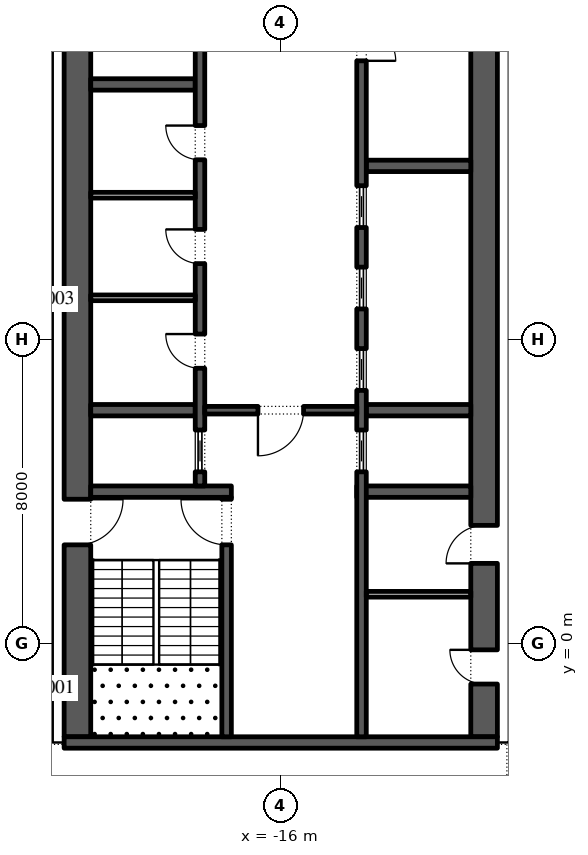
"""IFC4 building model, lengths in metres.
Left out: names, types, materials, properties, quantities, classifications, styles, units other than length and angle.
Written with IfcOpenShell. Run it as: python <this file> out.ifc"""

import sys

from ifc_helpers import new_model, si_unit, direction, frame, frame_2d, origin, place, context, subcontext, project, spatial, rectangle, extrude, element, fill, save


model = new_model("IFC4")
c1 = context("Model", 3, precision=1e-05, world=origin(), true_north=direction((0.0, 1.0)))
c2 = subcontext(c1, "Body", "Model", "MODEL_VIEW")
j1 = project(units=[si_unit("LENGTHUNIT", "METRE"), si_unit("PLANEANGLEUNIT", "RADIAN")], contexts=[c1])
p1 = place(None, origin())
s1 = spatial("IfcSite", under=j1, at=p1, CompositionType="ELEMENT")
p2 = place(p1, origin())
s2 = spatial("IfcBuilding", under=s1, at=p2, CompositionType="ELEMENT")
p3 = place(p2, frame((0.0, 0.0, 171.6)))
s3 = spatial("IfcBuildingStorey", under=s2, at=p3, CompositionType="ELEMENT", Elevation=171.6)
p4 = place(p3, frame((-33.157, 30.092, 0.0), z_axis=(0.0, 0.0, 1.0), x_axis=(0.224950279389, -0.974370243697, 0.0)))
e1 = element("IfcWall", 1, at=p4, inside=s3, PredefinedType="STANDARD", context=c2, shape_type="SweptSolid", body=[
    extrude(rectangle(XDim=49.5, YDim=0.3, at=frame_2d((24.75, 0.0))), origin(), (0.0, 0.0, 1.0), 4.0),
])
p5 = place(p4, frame((2.207, 0.0, 0.0)))
e2 = element("IfcOpeningElement", 2, at=p5, cuts=e1, PredefinedType="OPENING", context=c2, shape_type="SweptSolid", body=[
    extrude(rectangle(XDim=2.4, YDim=3.5, at=frame_2d((1.2, 1.75))), frame((0.0, 0.16, 0.0), z_axis=(0.0, -1.0, 0.0), x_axis=(1.0, 0.0, 0.0)), (0.0, 0.0, 1.0), 0.32),
])
p6 = place(p4, frame((8.121, 0.0, 0.45)))
e3 = element("IfcOpeningElement", 3, at=p6, cuts=e1, PredefinedType="OPENING", context=c2, shape_type="SweptSolid", body=[
    extrude(rectangle(XDim=4.5, YDim=2.825, at=frame_2d((2.25, 1.413))), frame((0.0, 0.16, 0.0), z_axis=(0.0, -1.0, 0.0), x_axis=(1.0, 0.0, 0.0)), (0.0, 0.0, 1.0), 0.32),
])
p7 = place(p4, frame((15.236, 0.0, 0.45)))
e4 = element("IfcOpeningElement", 4, at=p7, cuts=e1, PredefinedType="OPENING", context=c2, shape_type="SweptSolid", body=[
    extrude(rectangle(XDim=4.5, YDim=2.95, at=frame_2d((2.25, 1.475))), frame((0.0, 0.16, 0.0), z_axis=(0.0, -1.0, 0.0), x_axis=(1.0, 0.0, 0.0)), (0.0, 0.0, 1.0), 0.32),
])
p8 = place(p4, frame((22.35, 0.0, 0.45)))
e5 = element("IfcOpeningElement", 5, at=p8, cuts=e1, PredefinedType="OPENING", context=c2, shape_type="SweptSolid", body=[
    extrude(rectangle(XDim=4.5, YDim=3.0, at=frame_2d((2.25, 1.5))), frame((0.0, 0.16, 0.0), z_axis=(0.0, -1.0, 0.0), x_axis=(1.0, 0.0, 0.0)), (0.0, 0.0, 1.0), 0.32),
])
p9 = place(p4, frame((30.514, 0.0, 0.0)))
e6 = element("IfcOpeningElement", 6, at=p9, cuts=e1, PredefinedType="OPENING", context=c2, shape_type="SweptSolid", body=[
    extrude(rectangle(XDim=2.4, YDim=3.5, at=frame_2d((1.2, 1.75))), frame((0.0, 0.16, 0.0), z_axis=(0.0, -1.0, 0.0), x_axis=(1.0, 0.0, 0.0)), (0.0, 0.0, 1.0), 0.32),
])
p10 = place(p4, frame((36.579, 0.0, 0.45)))
e7 = element("IfcOpeningElement", 7, at=p10, cuts=e1, PredefinedType="OPENING", context=c2, shape_type="SweptSolid", body=[
    extrude(rectangle(XDim=4.5, YDim=3.05, at=frame_2d((2.25, 1.525))), frame((0.0, 0.16, 0.0), z_axis=(0.0, -1.0, 0.0), x_axis=(1.0, 0.0, 0.0)), (0.0, 0.0, 1.0), 0.32),
])
p11 = place(p4, frame((43.693, 0.0, 0.45)))
e8 = element("IfcOpeningElement", 8, at=p11, cuts=e1, PredefinedType="OPENING", context=c2, shape_type="SweptSolid", body=[
    extrude(rectangle(XDim=4.5, YDim=3.05, at=frame_2d((2.25, 1.525))), frame((0.0, 0.16, 0.0), z_axis=(0.0, -1.0, 0.0), x_axis=(1.0, 0.0, 0.0)), (0.0, 0.0, 1.0), 0.32),
])
p12 = place(p3, frame((-21.35, -2.45, 0.0), z_axis=(0.0, 0.0, 1.0), x_axis=(0.0, 1.0, 0.0)))
e9 = element("IfcWall", 9, at=p12, inside=s3, PredefinedType="SHEAR", context=c2, shape_type="SweptSolid", body=[
    extrude(rectangle(XDim=27.9, YDim=0.7, at=frame_2d((13.95, 0.0))), origin(), (0.0, 0.0, 1.0), 4.0),
])
p13 = place(p12, frame((5.05, 0.0, 0.0)))
e10 = element("IfcOpeningElement", 10, at=p13, cuts=e9, PredefinedType="OPENING", context=c2, shape_type="SweptSolid", body=[
    extrude(rectangle(XDim=1.2, YDim=2.1, at=frame_2d((0.6, 1.05))), frame((0.0, 0.36, 0.0), z_axis=(0.0, -1.0, 0.0), x_axis=(1.0, 0.0, 0.0)), (0.0, 0.0, 1.0), 0.72),
])
p14 = place(p12, frame((21.65, 0.0, 0.0)))
e11 = element("IfcOpeningElement", 11, at=p14, cuts=e9, PredefinedType="OPENING", context=c2, shape_type="SweptSolid", body=[
    extrude(rectangle(XDim=1.2, YDim=2.1, at=frame_2d((0.6, 1.05))), frame((0.0, 0.36, 0.0), z_axis=(0.0, -1.0, 0.0), x_axis=(1.0, 0.0, 0.0)), (0.0, 0.0, 1.0), 0.72),
])
p15 = place(p3, frame((-10.65, -2.45, 0.0), z_axis=(0.0, 0.0, 1.0), x_axis=(0.0, 1.0, 0.0)))
e12 = element("IfcWall", 12, at=p15, inside=s3, PredefinedType="SHEAR", context=c2, shape_type="SweptSolid", body=[
    extrude(rectangle(XDim=27.9, YDim=0.7, at=frame_2d((13.95, 0.0))), origin(), (0.0, 0.0, 1.0), 4.0),
])
p16 = place(p15, frame((23.65, 0.0, 0.0)))
e13 = element("IfcOpeningElement", 13, at=p16, cuts=e12, PredefinedType="OPENING", context=c2, shape_type="SweptSolid", body=[
    extrude(rectangle(XDim=2.4, YDim=2.1, at=frame_2d((1.2, 1.05))), frame((0.0, 0.36, 0.0), z_axis=(0.0, -1.0, 0.0), x_axis=(1.0, 0.0, 0.0)), (0.0, 0.0, 1.0), 0.72),
])
p17 = place(p15, frame((1.387, 0.0, 0.0)))
e14 = element("IfcOpeningElement", 14, at=p17, cuts=e12, PredefinedType="OPENING", context=c2, shape_type="SweptSolid", body=[
    extrude(rectangle(XDim=0.9, YDim=2.1, at=frame_2d((0.45, 1.05))), frame((0.0, 0.36, 0.0), z_axis=(0.0, -1.0, 0.0), x_axis=(1.0, 0.0, 0.0)), (0.0, 0.0, 1.0), 0.72),
])
p18 = place(p15, frame((4.562, 0.0, 0.0)))
e15 = element("IfcOpeningElement", 15, at=p18, cuts=e12, PredefinedType="OPENING", context=c2, shape_type="SweptSolid", body=[
    extrude(rectangle(XDim=1.0, YDim=2.1, at=frame_2d((0.5, 1.05))), frame((0.0, 0.36, 0.0), z_axis=(0.0, -1.0, 0.0), x_axis=(1.0, 0.0, 0.0)), (0.0, 0.0, 1.0), 0.72),
])
p19 = place(p3, frame((-21.7, -2.6, 0.0), z_axis=(0.0, 0.0, 1.0), x_axis=(1.0, 0.0, 0.0)))
e16 = element("IfcWall", 16, at=p19, inside=s3, PredefinedType="SHEAR", context=c2, shape_type="SweptSolid", body=[
    extrude(rectangle(XDim=11.4, YDim=0.3, at=frame_2d((5.7, 0.0))), origin(), (0.0, 0.0, 1.0), 4.0),
])
p20 = place(p3, frame((-21.0, 4.0, 0.0), z_axis=(0.0, 0.0, 1.0), x_axis=(1.0, 0.0, 0.0)))
e17 = element("IfcWall", 17, at=p20, inside=s3, PredefinedType="SHEAR", context=c2, shape_type="SweptSolid", body=[
    extrude(rectangle(XDim=3.7, YDim=0.3, at=frame_2d((1.85, 0.0))), origin(), (0.0, 0.0, 1.0), 4.0),
])
p21 = place(p3, frame((-17.425, -2.45, 0.0), z_axis=(0.0, 0.0, 1.0), x_axis=(0.0, 1.0, 0.0)))
e18 = element("IfcWall", 18, at=p21, inside=s3, PredefinedType="SHEAR", context=c2, shape_type="SweptSolid", body=[
    extrude(rectangle(XDim=6.3, YDim=0.25, at=frame_2d((3.15, 0.0))), origin(), (0.0, 0.0, 1.0), 4.0),
])
p22 = place(p21, frame((5.05, 0.0, 0.0)))
e19 = element("IfcOpeningElement", 19, at=p22, cuts=e18, PredefinedType="OPENING", context=c2, shape_type="SweptSolid", body=[
    extrude(rectangle(XDim=1.2, YDim=2.1, at=frame_2d((0.6, 1.05))), frame((0.0, 0.135, 0.0), z_axis=(0.0, -1.0, 0.0), x_axis=(1.0, 0.0, 0.0)), (0.0, 0.0, 1.0), 0.27),
])
for number, where, z_axis, x_axis in (
    (20, (-21.0, 6.143, 0.0), (0.0, 0.0, 1.0), (1.0, 0.0, 0.0)),
    (21, (-21.0, 14.714, 0.0), (0.0, 0.0, 1.0), (1.0, 0.0, 0.0)),
):
    element("IfcWall", number, at=place(p3, frame(where, z_axis=z_axis, x_axis=x_axis)), inside=s3, PredefinedType="SHEAR", context=c2, shape_type="SweptSolid", body=[
        extrude(rectangle(XDim=2.75, YDim=0.3, at=frame_2d((1.375, 0.0))), origin(), (0.0, 0.0, 1.0), 4.0),
    ])
p23 = place(p3, frame((-18.125, 4.15, 0.0), z_axis=(0.0, 0.0, 1.0), x_axis=(0.0, 1.0, 0.0)))
e22 = element("IfcWall", 22, at=p23, inside=s3, PredefinedType="SHEAR", context=c2, shape_type="SweptSolid", body=[
    extrude(rectangle(XDim=14.7, YDim=0.25, at=frame_2d((7.35, 0.0))), origin(), (0.0, 0.0, 1.0), 4.0),
])
p24 = place(p23, frame((3.096, 0.0, 0.0)))
e23 = element("IfcOpeningElement", 23, at=p24, cuts=e22, PredefinedType="OPENING", context=c2, shape_type="SweptSolid", body=[
    extrude(rectangle(XDim=0.9, YDim=2.1, at=frame_2d((0.45, 1.05))), frame((0.0, 0.135, 0.0), z_axis=(0.0, -1.0, 0.0), x_axis=(1.0, 0.0, 0.0)), (0.0, 0.0, 1.0), 0.27),
])
p25 = place(p23, frame((5.85, 0.0, 0.0)))
e24 = element("IfcOpeningElement", 24, at=p25, cuts=e22, PredefinedType="OPENING", context=c2, shape_type="SweptSolid", body=[
    extrude(rectangle(XDim=0.9, YDim=2.1, at=frame_2d((0.45, 1.05))), frame((0.0, 0.135, 0.0), z_axis=(0.0, -1.0, 0.0), x_axis=(1.0, 0.0, 0.0)), (0.0, 0.0, 1.0), 0.27),
])
p26 = place(p23, frame((8.582, 0.0, 0.0)))
e25 = element("IfcOpeningElement", 25, at=p26, cuts=e22, PredefinedType="OPENING", context=c2, shape_type="SweptSolid", body=[
    extrude(rectangle(XDim=0.9, YDim=2.1, at=frame_2d((0.45, 1.05))), frame((0.0, 0.135, 0.0), z_axis=(0.0, -1.0, 0.0), x_axis=(1.0, 0.0, 0.0)), (0.0, 0.0, 1.0), 0.27),
])
p27 = place(p23, frame((0.371, 0.0, 0.0)))
e26 = element("IfcOpeningElement", 26, at=p27, cuts=e22, PredefinedType="OPENING", context=c2, shape_type="SweptSolid", body=[
    extrude(rectangle(XDim=1.1, YDim=2.1, at=frame_2d((0.55, 1.05))), frame((0.0, 0.135, 0.0), z_axis=(0.0, -1.0, 0.0), x_axis=(1.0, 0.0, 0.0)), (0.0, 0.0, 1.0), 0.27),
])
p28 = place(p23, frame((13.229, 0.0, 0.0)))
e27 = element("IfcOpeningElement", 27, at=p28, cuts=e22, PredefinedType="OPENING", context=c2, shape_type="SweptSolid", body=[
    extrude(rectangle(XDim=1.1, YDim=2.1, at=frame_2d((0.55, 1.05))), frame((0.0, 0.135, 0.0), z_axis=(0.0, -1.0, 0.0), x_axis=(1.0, 0.0, 0.0)), (0.0, 0.0, 1.0), 0.27),
])
for number, where, z_axis, x_axis in (
    (28, (-21.0, 9.1, 0.0), (0.0, 0.0, 1.0), (1.0, 0.0, 0.0)),
    (29, (-21.0, 11.8, 0.0), (0.0, 0.0, 1.0), (1.0, 0.0, 0.0)),
):
    element("IfcWall", number, at=place(p3, frame(where, z_axis=z_axis, x_axis=x_axis)), inside=s3, PredefinedType="PARTITIONING", context=c2, shape_type="SweptSolid", body=[
        extrude(rectangle(XDim=2.75, YDim=0.15, at=frame_2d((1.375, 0.0))), origin(), (0.0, 0.0, 1.0), 4.0),
    ])
p29 = place(p3, frame((-14.0, 4.0, 0.0), z_axis=(0.0, 0.0, 1.0), x_axis=(1.0, 0.0, 0.0)))
e30 = element("IfcWall", 30, at=p29, inside=s3, PredefinedType="SHEAR", context=c2, shape_type="SweptSolid", body=[
    extrude(rectangle(XDim=3.0, YDim=0.3, at=frame_2d((1.5, 0.0))), origin(), (0.0, 0.0, 1.0), 4.0),
])
for number, where, z_axis, x_axis in (
    (31, (-13.75, 6.143, 0.0), (0.0, 0.0, 1.0), (1.0, 0.0, 0.0)),
    (32, (-13.75, 12.571, 0.0), (0.0, 0.0, 1.0), (1.0, 0.0, 0.0)),
):
    element("IfcWall", number, at=place(p3, frame(where, z_axis=z_axis, x_axis=x_axis)), inside=s3, PredefinedType="SHEAR", context=c2, shape_type="SweptSolid", body=[
        extrude(rectangle(XDim=2.75, YDim=0.3, at=frame_2d((1.375, 0.0))), origin(), (0.0, 0.0, 1.0), 4.0),
    ])
p30 = place(p3, frame((-13.875, -2.45, 0.0), z_axis=(0.0, 0.0, 1.0), x_axis=(0.0, 1.0, 0.0)))
e33 = element("IfcWall", 33, at=p30, inside=s3, PredefinedType="SHEAR", context=c2, shape_type="SweptSolid", body=[
    extrude(rectangle(XDim=21.3, YDim=0.25, at=frame_2d((10.65, 0.0))), origin(), (0.0, 0.0, 1.0), 4.0),
])
p31 = place(p30, frame((17.786, 0.0, 0.0)))
e34 = element("IfcOpeningElement", 34, at=p31, cuts=e33, PredefinedType="OPENING", context=c2, shape_type="SweptSolid", body=[
    extrude(rectangle(XDim=0.9, YDim=2.1, at=frame_2d((0.45, 1.05))), frame((0.0, 0.135, 0.0), z_axis=(0.0, -1.0, 0.0), x_axis=(1.0, 0.0, 0.0)), (0.0, 0.0, 1.0), 0.27),
])
p32 = place(p30, frame((6.971, 0.0, 0.0)))
e35 = element("IfcOpeningElement", 35, at=p32, cuts=e33, PredefinedType="OPENING", context=c2, shape_type="SweptSolid", body=[
    extrude(rectangle(XDim=1.1, YDim=2.1, at=frame_2d((0.55, 1.05))), frame((0.0, 0.135, 0.0), z_axis=(0.0, -1.0, 0.0), x_axis=(1.0, 0.0, 0.0)), (0.0, 0.0, 1.0), 0.27),
])
p33 = place(p30, frame((9.114, 0.0, 0.0)))
e36 = element("IfcOpeningElement", 36, at=p33, cuts=e33, PredefinedType="OPENING", context=c2, shape_type="SweptSolid", body=[
    extrude(rectangle(XDim=1.1, YDim=2.1, at=frame_2d((0.55, 1.05))), frame((0.0, 0.135, 0.0), z_axis=(0.0, -1.0, 0.0), x_axis=(1.0, 0.0, 0.0)), (0.0, 0.0, 1.0), 0.27),
])
p34 = place(p30, frame((11.257, 0.0, 0.0)))
e37 = element("IfcOpeningElement", 37, at=p34, cuts=e33, PredefinedType="OPENING", context=c2, shape_type="SweptSolid", body=[
    extrude(rectangle(XDim=1.1, YDim=2.1, at=frame_2d((0.55, 1.05))), frame((0.0, 0.135, 0.0), z_axis=(0.0, -1.0, 0.0), x_axis=(1.0, 0.0, 0.0)), (0.0, 0.0, 1.0), 0.27),
])
p35 = place(p30, frame((13.4, 0.0, 0.0)))
e38 = element("IfcOpeningElement", 38, at=p35, cuts=e33, PredefinedType="OPENING", context=c2, shape_type="SweptSolid", body=[
    extrude(rectangle(XDim=1.1, YDim=2.1, at=frame_2d((0.55, 1.05))), frame((0.0, 0.135, 0.0), z_axis=(0.0, -1.0, 0.0), x_axis=(1.0, 0.0, 0.0)), (0.0, 0.0, 1.0), 0.27),
])
p36 = place(p3, frame((-18.0, 6.143, 0.0), z_axis=(0.0, 0.0, 1.0), x_axis=(1.0, 0.0, 0.0)))
e39 = element("IfcWall", 39, at=p36, inside=s3, PredefinedType="SHEAR", context=c2, shape_type="SweptSolid", body=[
    extrude(rectangle(XDim=4.0, YDim=0.2, at=frame_2d((2.0, 0.0))), origin(), (0.0, 0.0, 1.0), 4.0),
])
p37 = place(p36, frame((1.4, 0.0, 0.0)))
e40 = element("IfcOpeningElement", 40, at=p37, cuts=e39, PredefinedType="OPENING", context=c2, shape_type="SweptSolid", body=[
    extrude(rectangle(XDim=1.2, YDim=2.1, at=frame_2d((0.6, 1.05))), frame((0.0, 0.11, 0.0), z_axis=(0.0, -1.0, 0.0), x_axis=(1.0, 0.0, 0.0)), (0.0, 0.0, 1.0), 0.22),
])
p38 = place(p3, frame((-13.75, 1.3, 0.0), z_axis=(0.0, 0.0, 1.0), x_axis=(1.0, 0.0, 0.0)))
e41 = element("IfcWall", 41, at=p38, inside=s3, PredefinedType="PARTITIONING", context=c2, shape_type="SweptSolid", body=[
    extrude(rectangle(XDim=2.75, YDim=0.15, at=frame_2d((1.375, 0.0))), origin(), (0.0, 0.0, 1.0), 4.0),
])
p39 = place(p24, origin())
e42 = element("IfcDoor", 42, at=p39, inside=s3, OperationType="SINGLE_SWING_LEFT", PredefinedType="DOOR", context=c2, shape_type="SweptSolid", body=[
    extrude(rectangle(XDim=0.9, YDim=2.1, at=frame_2d((0.45, 1.05))), frame((0.0, 0.125, 0.0), z_axis=(0.0, -1.0, 0.0), x_axis=(1.0, 0.0, 0.0)), (0.0, 0.0, 1.0), 0.05),
])
fill(e23, e42)
p40 = place(p25, origin())
e43 = element("IfcDoor", 43, at=p40, inside=s3, OperationType="SINGLE_SWING_LEFT", PredefinedType="DOOR", context=c2, shape_type="SweptSolid", body=[
    extrude(rectangle(XDim=0.9, YDim=2.1, at=frame_2d((0.45, 1.05))), frame((0.0, 0.125, 0.0), z_axis=(0.0, -1.0, 0.0), x_axis=(1.0, 0.0, 0.0)), (0.0, 0.0, 1.0), 0.05),
])
fill(e24, e43)
p41 = place(p26, origin())
e44 = element("IfcDoor", 44, at=p41, inside=s3, OperationType="SINGLE_SWING_LEFT", PredefinedType="DOOR", context=c2, shape_type="SweptSolid", body=[
    extrude(rectangle(XDim=0.9, YDim=2.1, at=frame_2d((0.45, 1.05))), frame((0.0, 0.125, 0.0), z_axis=(0.0, -1.0, 0.0), x_axis=(1.0, 0.0, 0.0)), (0.0, 0.0, 1.0), 0.05),
])
fill(e25, e44)
p42 = place(p27, origin())
e45 = element("IfcDoor", 45, at=p42, inside=s3, OperationType="SLIDING_TO_LEFT", PredefinedType="DOOR", context=c2, shape_type="SweptSolid", body=[
    extrude(rectangle(XDim=1.1, YDim=2.1, at=frame_2d((0.55, 1.05))), frame((0.0, 0.025, 0.0), z_axis=(0.0, -1.0, 0.0), x_axis=(1.0, 0.0, 0.0)), (0.0, 0.0, 1.0), 0.05),
])
fill(e26, e45)
p43 = place(p31, frame((0.9, -0.2, 0.0), z_axis=(0.0, 0.0, 1.0), x_axis=(-1.0, 0.0, 0.0)))
e46 = element("IfcDoor", 46, at=p43, inside=s3, OperationType="SINGLE_SWING_LEFT", PredefinedType="DOOR", context=c2, shape_type="SweptSolid", body=[
    extrude(rectangle(XDim=0.9, YDim=2.1, at=frame_2d((0.45, 1.05))), frame((0.0, -0.075, 0.0), z_axis=(0.0, -1.0, 0.0), x_axis=(1.0, 0.0, 0.0)), (0.0, 0.0, 1.0), 0.05),
])
fill(e34, e46)
p44 = place(p32, origin())
e47 = element("IfcDoor", 47, at=p44, inside=s3, OperationType="SLIDING_TO_LEFT", PredefinedType="DOOR", context=c2, shape_type="SweptSolid", body=[
    extrude(rectangle(XDim=1.1, YDim=2.1, at=frame_2d((0.55, 1.05))), frame((0.0, 0.025, 0.0), z_axis=(0.0, -1.0, 0.0), x_axis=(1.0, 0.0, 0.0)), (0.0, 0.0, 1.0), 0.05),
])
fill(e35, e47)
p45 = place(p33, origin())
e48 = element("IfcDoor", 48, at=p45, inside=s3, OperationType="SLIDING_TO_LEFT", PredefinedType="DOOR", context=c2, shape_type="SweptSolid", body=[
    extrude(rectangle(XDim=1.1, YDim=2.1, at=frame_2d((0.55, 1.05))), frame((0.0, 0.025, 0.0), z_axis=(0.0, -1.0, 0.0), x_axis=(1.0, 0.0, 0.0)), (0.0, 0.0, 1.0), 0.05),
])
fill(e36, e48)
p46 = place(p34, origin())
e49 = element("IfcDoor", 49, at=p46, inside=s3, OperationType="SLIDING_TO_LEFT", PredefinedType="DOOR", context=c2, shape_type="SweptSolid", body=[
    extrude(rectangle(XDim=1.1, YDim=2.1, at=frame_2d((0.55, 1.05))), frame((0.0, 0.025, 0.0), z_axis=(0.0, -1.0, 0.0), x_axis=(1.0, 0.0, 0.0)), (0.0, 0.0, 1.0), 0.05),
])
fill(e37, e49)
p47 = place(p35, origin())
e50 = element("IfcDoor", 50, at=p47, inside=s3, OperationType="SLIDING_TO_LEFT", PredefinedType="DOOR", context=c2, shape_type="SweptSolid", body=[
    extrude(rectangle(XDim=1.1, YDim=2.1, at=frame_2d((0.55, 1.05))), frame((0.0, 0.025, 0.0), z_axis=(0.0, -1.0, 0.0), x_axis=(1.0, 0.0, 0.0)), (0.0, 0.0, 1.0), 0.05),
])
fill(e38, e50)
p48 = place(p37, frame((1.2, 0.0, 0.0), z_axis=(0.0, 0.0, 1.0), x_axis=(-1.0, 0.0, 0.0)))
e51 = element("IfcDoor", 51, at=p48, inside=s3, OperationType="SINGLE_SWING_LEFT", PredefinedType="DOOR", context=c2, shape_type="SweptSolid", body=[
    extrude(rectangle(XDim=1.2, YDim=2.1, at=frame_2d((0.6, 1.05))), frame((0.0, 0.025, 0.0), z_axis=(0.0, -1.0, 0.0), x_axis=(1.0, 0.0, 0.0)), (0.0, 0.0, 1.0), 0.05),
])
fill(e40, e51)
p49 = place(p22, origin())
e52 = element("IfcDoor", 52, at=p49, inside=s3, OperationType="SINGLE_SWING_LEFT", PredefinedType="DOOR", context=c2, shape_type="SweptSolid", body=[
    extrude(rectangle(XDim=1.2, YDim=2.1, at=frame_2d((0.6, 1.05))), frame((0.0, 0.025, 0.0), z_axis=(0.0, -1.0, 0.0), x_axis=(1.0, 0.0, 0.0)), (0.0, 0.0, 1.0), 0.05),
])
fill(e19, e52)
p50 = place(p13, frame((1.2, 0.0, 0.0), z_axis=(0.0, 0.0, 1.0), x_axis=(-1.0, 0.0, 0.0)))
e53 = element("IfcDoor", 53, at=p50, inside=s3, OperationType="SINGLE_SWING_RIGHT", PredefinedType="DOOR", context=c2, shape_type="SweptSolid", body=[
    extrude(rectangle(XDim=1.2, YDim=2.1, at=frame_2d((0.6, 1.05))), frame((0.0, 0.025, 0.0), z_axis=(0.0, -1.0, 0.0), x_axis=(1.0, 0.0, 0.0)), (0.0, 0.0, 1.0), 0.05),
])
fill(e10, e53)
p51 = place(p17, origin())
e54 = element("IfcDoor", 54, at=p51, inside=s3, OperationType="SINGLE_SWING_LEFT", PredefinedType="DOOR", context=c2, shape_type="SweptSolid", body=[
    extrude(rectangle(XDim=0.9, YDim=2.1, at=frame_2d((0.45, 1.05))), frame((0.0, 0.35, 0.0), z_axis=(0.0, -1.0, 0.0), x_axis=(1.0, 0.0, 0.0)), (0.0, 0.0, 1.0), 0.05),
])
fill(e14, e54)
p52 = place(p18, origin())
e55 = element("IfcDoor", 55, at=p52, inside=s3, OperationType="SINGLE_SWING_RIGHT", PredefinedType="DOOR", context=c2, shape_type="SweptSolid", body=[
    extrude(rectangle(XDim=1.0, YDim=2.1, at=frame_2d((0.5, 1.05))), frame((0.0, 0.35, 0.0), z_axis=(0.0, -1.0, 0.0), x_axis=(1.0, 0.0, 0.0)), (0.0, 0.0, 1.0), 0.05),
])
fill(e15, e55)
save(model, sys.argv[1])
